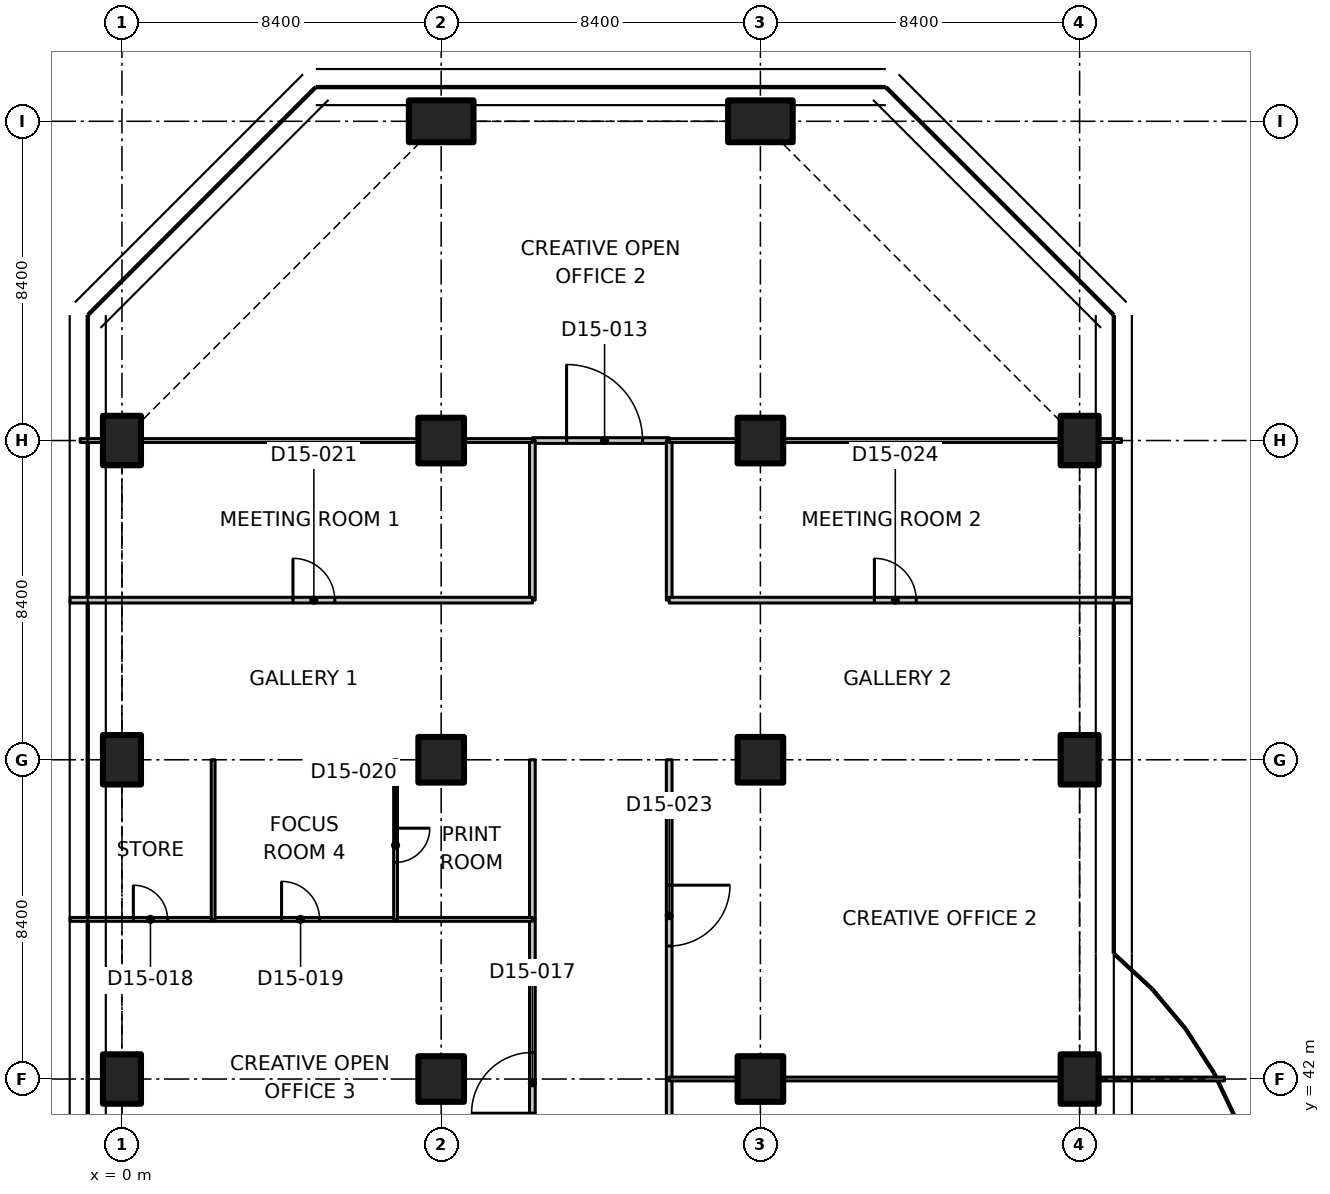
"""IFC4 building model, lengths in metres.
Left out: names, types, materials, properties, quantities, classifications, styles, units other than length and angle.
Written with IfcOpenShell. Run it as: python <this file> out.ifc"""

import sys

from ifc_helpers import new_model, si_unit, direction, frame, frame_2d, origin, origin_2d, place, context, subcontext, project, spatial, polyline, rectangle, outline, extrude, element, fill, save


model = new_model("IFC4")
c1 = context("Model", 3, precision=1e-05, world=origin(), true_north=direction((0.0, 1.0)))
c2 = subcontext(c1, "Body", "Model", "MODEL_VIEW")
j1 = project(units=[si_unit("LENGTHUNIT", "METRE"), si_unit("PLANEANGLEUNIT", "RADIAN")], contexts=[c1])
p1 = place(None, origin())
s1 = spatial("IfcSite", under=j1, at=p1, CompositionType="ELEMENT")
p2 = place(p1, origin())
s2 = spatial("IfcBuilding", under=s1, at=p2, CompositionType="ELEMENT")
p3 = place(p2, frame((0.0, 0.0, 120.5)))
s3 = spatial("IfcBuildingStorey", under=s2, at=p3, CompositionType="ELEMENT", Elevation=120.5)
for number, where, z_axis, x_axis in (
    (1, (0.0, 42.0, 0.0), (0.0, 0.0, 1.0), (1.0, 0.0, 0.0)),
    (2, (0.0, 50.4, 0.0), (0.0, 0.0, 1.0), (1.0, 0.0, 0.0)),
    (3, (0.0, 58.8, 0.0), (0.0, 0.0, 1.0), (1.0, 0.0, 0.0)),
):
    element("IfcColumn", number, at=place(p3, frame(where, z_axis=z_axis, x_axis=x_axis)), inside=s3, PredefinedType="COLUMN", context=c2, shape_type="SweptSolid", body=[
        extrude(rectangle(XDim=1.0, YDim=1.3, at=origin_2d()), origin(), (0.0, 0.0, 1.0), 3.35),
    ])
for number, where, z_axis, x_axis in (
    (4, (8.4, 42.0, 0.0), (0.0, 0.0, 1.0), (1.0, 0.0, 0.0)),
    (5, (8.4, 50.4, 0.0), (0.0, 0.0, 1.0), (1.0, 0.0, 0.0)),
    (6, (8.4, 58.8, 0.0), (0.0, 0.0, 1.0), (1.0, 0.0, 0.0)),
):
    element("IfcColumn", number, at=place(p3, frame(where, z_axis=z_axis, x_axis=x_axis)), inside=s3, PredefinedType="COLUMN", context=c2, shape_type="SweptSolid", body=[
        extrude(rectangle(XDim=1.2, YDim=1.2, at=origin_2d()), origin(), (0.0, 0.0, 1.0), 3.35),
    ])
p4 = place(p3, frame((8.4, 67.2, 0.0), z_axis=(0.0, 0.0, 1.0), x_axis=(0.0, 1.0, 0.0)))
e7 = element("IfcColumn", 7, at=p4, inside=s3, PredefinedType="COLUMN", context=c2, shape_type="SweptSolid", body=[
    extrude(rectangle(XDim=1.1, YDim=1.7, at=origin_2d()), origin(), (0.0, 0.0, 1.0), 3.35),
])
for number, where, z_axis, x_axis in (
    (8, (16.8, 42.0, 0.0), (0.0, 0.0, 1.0), (1.0, 0.0, 0.0)),
    (9, (16.8, 50.4, 0.0), (0.0, 0.0, 1.0), (1.0, 0.0, 0.0)),
    (10, (16.8, 58.8, 0.0), (0.0, 0.0, 1.0), (1.0, 0.0, 0.0)),
):
    element("IfcColumn", number, at=place(p3, frame(where, z_axis=z_axis, x_axis=x_axis)), inside=s3, PredefinedType="COLUMN", context=c2, shape_type="SweptSolid", body=[
        extrude(rectangle(XDim=1.2, YDim=1.2, at=origin_2d()), origin(), (0.0, 0.0, 1.0), 3.35),
    ])
p5 = place(p3, frame((16.8, 67.2, 0.0), z_axis=(0.0, 0.0, 1.0), x_axis=(0.0, 1.0, 0.0)))
e11 = element("IfcColumn", 11, at=p5, inside=s3, PredefinedType="COLUMN", context=c2, shape_type="SweptSolid", body=[
    extrude(rectangle(XDim=1.1, YDim=1.7, at=origin_2d()), origin(), (0.0, 0.0, 1.0), 3.35),
])
for number, where, z_axis, x_axis in (
    (12, (25.2, 42.0, 0.0), (0.0, 0.0, 1.0), (1.0, 0.0, 0.0)),
    (13, (25.2, 50.4, 0.0), (0.0, 0.0, 1.0), (1.0, 0.0, 0.0)),
    (14, (25.2, 58.8, 0.0), (0.0, 0.0, 1.0), (1.0, 0.0, 0.0)),
):
    element("IfcColumn", number, at=place(p3, frame(where, z_axis=z_axis, x_axis=x_axis)), inside=s3, PredefinedType="COLUMN", context=c2, shape_type="SweptSolid", body=[
        extrude(rectangle(XDim=1.0, YDim=1.3, at=origin_2d()), origin(), (0.0, 0.0, 1.0), 3.35),
    ])
p6 = place(p3, frame((10.8, 58.8, 0.0), z_axis=(0.0, 0.0, 1.0), x_axis=(1.0, 0.0, 0.0)))
e15 = element("IfcWall", 15, at=p6, inside=s3, PredefinedType="PARTITIONING", context=c2, shape_type="SweptSolid", body=[
    extrude(rectangle(XDim=3.6, YDim=0.15, at=frame_2d((1.8, 0.0))), origin(), (0.0, 0.0, 1.0), 3.33),
])
p7 = place(p6, frame((0.9, 0.0, 0.0)))
e16 = element("IfcOpeningElement", 16, at=p7, cuts=e15, PredefinedType="OPENING", context=c2, shape_type="SweptSolid", body=[
    extrude(rectangle(XDim=2.0, YDim=2.4, at=frame_2d((1.0, 1.2))), frame((0.0, 0.085, 0.0), z_axis=(0.0, -1.0, 0.0), x_axis=(1.0, 0.0, 0.0)), (0.0, 0.0, 1.0), 0.17),
])
p8 = place(p3, frame((10.8, 37.8, 0.0), z_axis=(0.0, 0.0, 1.0), x_axis=(0.0, 1.0, 0.0)))
e17 = element("IfcWall", 17, at=p8, inside=s3, PredefinedType="PARTITIONING", context=c2, shape_type="SweptSolid", body=[
    extrude(rectangle(XDim=8.4, YDim=0.15, at=frame_2d((4.2, 0.0))), origin(), (0.0, 0.0, 1.0), 3.33),
])
p9 = place(p8, frame((3.3, 0.0, 0.0)))
e18 = element("IfcOpeningElement", 18, at=p9, cuts=e17, PredefinedType="OPENING", context=c2, shape_type="SweptSolid", body=[
    extrude(rectangle(XDim=1.6, YDim=2.1, at=frame_2d((0.8, 1.05))), frame((0.0, 0.085, 0.0), z_axis=(0.0, -1.0, 0.0), x_axis=(1.0, 0.0, 0.0)), (0.0, 0.0, 1.0), 0.17),
])
for number, where, z_axis, x_axis in (
    (19, (10.8, 46.2, 0.0), (0.0, 0.0, 1.0), (0.0, 1.0, 0.0)),
    (20, (10.8, 54.6, 0.0), (0.0, 0.0, 1.0), (0.0, 1.0, 0.0)),
):
    element("IfcWall", number, at=place(p3, frame(where, z_axis=z_axis, x_axis=x_axis)), inside=s3, PredefinedType="PARTITIONING", context=c2, shape_type="SweptSolid", body=[
        extrude(rectangle(XDim=4.2, YDim=0.15, at=frame_2d((2.1, 0.0))), origin(), (0.0, 0.0, 1.0), 3.33),
    ])
p10 = place(p3, frame((14.4, 42.0, 0.0), z_axis=(0.0, 0.0, 1.0), x_axis=(0.0, -1.0, 0.0)))
e21 = element("IfcWall", 21, at=p10, inside=s3, PredefinedType="PARTITIONING", context=c2, shape_type="SweptSolid", body=[
    extrude(rectangle(XDim=8.4, YDim=0.15, at=frame_2d((4.2, 0.0))), origin(), (0.0, 0.0, 1.0), 3.33),
])
p11 = place(p3, frame((14.4, 50.4, 0.0), z_axis=(0.0, 0.0, 1.0), x_axis=(0.0, -1.0, 0.0)))
e22 = element("IfcWall", 22, at=p11, inside=s3, PredefinedType="PARTITIONING", context=c2, shape_type="SweptSolid", body=[
    extrude(rectangle(XDim=8.4, YDim=0.15, at=frame_2d((4.2, 0.0))), origin(), (0.0, 0.0, 1.0), 3.33),
])
p12 = place(p11, frame((3.3, 0.0, 0.0)))
e23 = element("IfcOpeningElement", 23, at=p12, cuts=e22, PredefinedType="OPENING", context=c2, shape_type="SweptSolid", body=[
    extrude(rectangle(XDim=1.6, YDim=2.1, at=frame_2d((0.8, 1.05))), frame((0.0, 0.085, 0.0), z_axis=(0.0, -1.0, 0.0), x_axis=(1.0, 0.0, 0.0)), (0.0, 0.0, 1.0), 0.17),
])
p13 = place(p3, frame((14.4, 58.8, 0.0), z_axis=(0.0, 0.0, 1.0), x_axis=(0.0, -1.0, 0.0)))
e24 = element("IfcWall", 24, at=p13, inside=s3, PredefinedType="PARTITIONING", context=c2, shape_type="SweptSolid", body=[
    extrude(rectangle(XDim=4.2, YDim=0.15, at=frame_2d((2.1, 0.0))), origin(), (0.0, 0.0, 1.0), 3.33),
])
p14 = place(p3, frame((10.8, 58.8, 0.0), z_axis=(0.0, 0.0, 1.0), x_axis=(-1.0, 0.0, 0.0)))
e25 = element("IfcWall", 25, at=p14, inside=s3, PredefinedType="PARTITIONING", context=c2, shape_type="SweptSolid", body=[
    extrude(rectangle(XDim=1.78, YDim=0.1, at=frame_2d((0.89, 0.0))), origin(), (0.0, 0.0, 1.0), 3.33),
])
p15 = place(p3, frame((7.78, 58.8, 0.0), z_axis=(0.0, 0.0, 1.0), x_axis=(-1.0, 0.0, 0.0)))
e26 = element("IfcWall", 26, at=p15, inside=s3, PredefinedType="PARTITIONING", context=c2, shape_type="SweptSolid", body=[
    extrude(outline(polyline([(0.0, 0.0), (7.26, 0.0), (7.26, 2.98), (7.116, 2.98), (7.114, 3.33), (0.0, 3.33), (0.0, 0.0)])), frame((0.0, 0.05, 0.0), z_axis=(0.0, -1.0, 0.0), x_axis=(1.0, 0.0, 0.0)), (0.0, 0.0, 1.0), 0.1),
])
for number, where, z_axis, x_axis in (
    (27, (-0.52, 58.8, 0.0), (0.0, 0.0, 1.0), (-1.0, 0.0, 0.0)),
    (28, (26.3, 58.8, 0.0), (0.0, 0.0, 1.0), (-1.0, 0.0, 0.0)),
):
    element("IfcWall", number, at=place(p3, frame(where, z_axis=z_axis, x_axis=x_axis)), inside=s3, PredefinedType="PARTITIONING", context=c2, shape_type="SweptSolid", body=[
        extrude(rectangle(XDim=0.58, YDim=0.1, at=frame_2d((0.29, 0.0))), origin(), (0.0, 0.0, 1.0), 3.33),
    ])
p16 = place(p3, frame((24.68, 58.8, 0.0), z_axis=(0.0, 0.0, 1.0), x_axis=(-1.0, 0.0, 0.0)))
e29 = element("IfcWall", 29, at=p16, inside=s3, PredefinedType="PARTITIONING", context=c2, shape_type="SweptSolid", body=[
    extrude(outline(polyline([(0.0, 0.0), (7.26, 0.0), (7.26, 3.33), (0.146, 3.33), (0.144, 2.98), (0.0, 2.98), (0.0, 0.0)])), frame((0.0, 0.05, 0.0), z_axis=(0.0, -1.0, 0.0), x_axis=(1.0, 0.0, 0.0)), (0.0, 0.0, 1.0), 0.1),
])
p17 = place(p3, frame((16.18, 58.8, 0.0), z_axis=(0.0, 0.0, 1.0), x_axis=(-1.0, 0.0, 0.0)))
e30 = element("IfcWall", 30, at=p17, inside=s3, PredefinedType="PARTITIONING", context=c2, shape_type="SweptSolid", body=[
    extrude(rectangle(XDim=1.78, YDim=0.1, at=frame_2d((0.89, 0.0))), origin(), (0.0, 0.0, 1.0), 3.33),
])
p18 = place(p3, frame((-1.365, 54.6, 0.0), z_axis=(0.0, 0.0, 1.0), x_axis=(1.0, 0.0, 0.0)))
e31 = element("IfcWall", 31, at=p18, inside=s3, PredefinedType="PARTITIONING", context=c2, shape_type="SweptSolid", body=[
    extrude(outline(polyline([(0.0, 0.0), (12.165, 0.0), (12.165, 3.33), (1.815, 3.33), (1.813, 2.98), (0.917, 2.98), (0.915, 3.33), (0.265, 3.33), (0.0, 3.33), (0.0, 0.0)])), frame((0.0, 0.075, 0.0), z_axis=(0.0, -1.0, 0.0), x_axis=(1.0, 0.0, 0.0)), (0.0, 0.0, 1.0), 0.15),
])
p19 = place(p18, frame((5.865, 0.0, 0.0)))
e32 = element("IfcOpeningElement", 32, at=p19, cuts=e31, PredefinedType="OPENING", context=c2, shape_type="SweptSolid", body=[
    extrude(rectangle(XDim=1.1, YDim=2.1, at=frame_2d((0.55, 1.05))), frame((0.0, 0.085, 0.0), z_axis=(0.0, -1.0, 0.0), x_axis=(1.0, 0.0, 0.0)), (0.0, 0.0, 1.0), 0.17),
])
p20 = place(p3, frame((-1.365, 46.2, 0.0), z_axis=(0.0, 0.0, 1.0), x_axis=(1.0, 0.0, 0.0)))
e33 = element("IfcWall", 33, at=p20, inside=s3, PredefinedType="PARTITIONING", context=c2, shape_type="SweptSolid", body=[
    extrude(rectangle(XDim=3.765, YDim=0.1, at=frame_2d((1.882, 0.0))), origin(), (0.0, 0.0, 1.0), 2.98),
])
p21 = place(p20, frame((1.665, 0.0, 0.0)))
e34 = element("IfcOpeningElement", 34, at=p21, cuts=e33, PredefinedType="OPENING", context=c2, shape_type="SweptSolid", body=[
    extrude(rectangle(XDim=0.9, YDim=2.1, at=frame_2d((0.45, 1.05))), frame((0.0, 0.06, 0.0), z_axis=(0.0, -1.0, 0.0), x_axis=(1.0, 0.0, 0.0)), (0.0, 0.0, 1.0), 0.12),
])
p22 = place(p3, frame((2.4, 46.2, 0.0), z_axis=(0.0, 0.0, 1.0), x_axis=(1.0, 0.0, 0.0)))
e35 = element("IfcWall", 35, at=p22, inside=s3, PredefinedType="PARTITIONING", context=c2, shape_type="SweptSolid", body=[
    extrude(rectangle(XDim=4.8, YDim=0.1, at=frame_2d((2.4, 0.0))), origin(), (0.0, 0.0, 1.0), 3.33),
])
p23 = place(p22, frame((1.8, 0.0, 0.0)))
e36 = element("IfcOpeningElement", 36, at=p23, cuts=e35, PredefinedType="OPENING", context=c2, shape_type="SweptSolid", body=[
    extrude(rectangle(XDim=1.0, YDim=2.1, at=frame_2d((0.5, 1.05))), frame((0.0, 0.06, 0.0), z_axis=(0.0, -1.0, 0.0), x_axis=(1.0, 0.0, 0.0)), (0.0, 0.0, 1.0), 0.12),
])
p24 = place(p3, frame((7.2, 46.2, 0.0), z_axis=(0.0, 0.0, 1.0), x_axis=(1.0, 0.0, 0.0)))
e37 = element("IfcWall", 37, at=p24, inside=s3, PredefinedType="PARTITIONING", context=c2, shape_type="SweptSolid", body=[
    extrude(rectangle(XDim=3.6, YDim=0.1, at=frame_2d((1.8, 0.0))), origin(), (0.0, 0.0, 1.0), 3.33),
])
p25 = place(p3, frame((2.4, 50.4, 0.0), z_axis=(0.0, 0.0, 1.0), x_axis=(0.0, -1.0, 0.0)))
e38 = element("IfcWall", 38, at=p25, inside=s3, PredefinedType="PARTITIONING", context=c2, shape_type="SweptSolid", body=[
    extrude(rectangle(XDim=4.2, YDim=0.1, at=frame_2d((2.1, 0.0))), origin(), (0.0, 0.0, 1.0), 3.33),
])
p26 = place(p3, frame((7.2, 50.4, 0.0), z_axis=(0.0, 0.0, 1.0), x_axis=(0.0, -1.0, 0.0)))
e39 = element("IfcWall", 39, at=p26, inside=s3, PredefinedType="PARTITIONING", context=c2, shape_type="SweptSolid", body=[
    extrude(rectangle(XDim=4.2, YDim=0.1, at=frame_2d((2.1, 0.0))), origin(), (0.0, 0.0, 1.0), 3.33),
])
p27 = place(p26, frame((1.8, 0.0, 0.0)))
e40 = element("IfcOpeningElement", 40, at=p27, cuts=e39, PredefinedType="OPENING", context=c2, shape_type="SweptSolid", body=[
    extrude(rectangle(XDim=0.9, YDim=2.1, at=frame_2d((0.45, 1.05))), frame((0.0, 0.06, 0.0), z_axis=(0.0, -1.0, 0.0), x_axis=(1.0, 0.0, 0.0)), (0.0, 0.0, 1.0), 0.12),
])
p28 = place(p3, frame((14.4, 54.6, 0.0), z_axis=(0.0, 0.0, 1.0), x_axis=(1.0, 0.0, 0.0)))
e41 = element("IfcWall", 41, at=p28, inside=s3, PredefinedType="PARTITIONING", context=c2, shape_type="SweptSolid", body=[
    extrude(outline(polyline([(0.0, 0.0), (12.165, 0.0), (12.165, 3.33), (11.9, 3.33), (11.25, 3.33), (11.248, 2.98), (10.352, 2.98), (10.35, 3.33), (0.0, 3.33), (0.0, 0.0)])), frame((0.0, 0.075, 0.0), z_axis=(0.0, -1.0, 0.0), x_axis=(1.0, 0.0, 0.0)), (0.0, 0.0, 1.0), 0.15),
])
p29 = place(p28, frame((5.4, 0.0, 0.0)))
e42 = element("IfcOpeningElement", 42, at=p29, cuts=e41, PredefinedType="OPENING", context=c2, shape_type="SweptSolid", body=[
    extrude(rectangle(XDim=1.1, YDim=2.1, at=frame_2d((0.55, 1.05))), frame((0.0, 0.085, 0.0), z_axis=(0.0, -1.0, 0.0), x_axis=(1.0, 0.0, 0.0)), (0.0, 0.0, 1.0), 0.17),
])
p30 = place(p3, frame((14.4, 42.0, 0.0), z_axis=(0.0, 0.0, 1.0), x_axis=(1.0, 0.0, 0.0)))
e43 = element("IfcWall", 43, at=p30, inside=s3, PredefinedType="PARTITIONING", context=c2, shape_type="SweptSolid", body=[
    extrude(rectangle(XDim=1.78, YDim=0.1, at=frame_2d((0.89, 0.0))), origin(), (0.0, 0.0, 1.0), 3.33),
])
p31 = place(p3, frame((17.42, 42.0, 0.0), z_axis=(0.0, 0.0, 1.0), x_axis=(1.0, 0.0, 0.0)))
e44 = element("IfcWall", 44, at=p31, inside=s3, PredefinedType="PARTITIONING", context=c2, shape_type="SweptSolid", body=[
    extrude(rectangle(XDim=7.26, YDim=0.1, at=frame_2d((3.63, 0.0))), origin(), (0.0, 0.0, 1.0), 3.33),
])
p32 = place(p3, frame((25.72, 42.0, 0.0), z_axis=(0.0, 0.0, 1.0), x_axis=(1.0, 0.0, 0.0)))
e45 = element("IfcWall", 45, at=p32, inside=s3, PredefinedType="PARTITIONING", context=c2, shape_type="SweptSolid", body=[
    extrude(rectangle(XDim=3.292, YDim=0.1, at=frame_2d((1.646, 0.0))), origin(), (0.0, 0.0, 1.0), 2.98),
])
p33 = place(p7, origin())
e46 = element("IfcDoor", 46, at=p33, inside=s3, OperationType="DOUBLE_DOOR_SINGLE_SWING", PredefinedType="DOOR", context=c2, shape_type="SweptSolid", body=[
    extrude(rectangle(XDim=2.0, YDim=2.4, at=frame_2d((1.0, 1.2))), frame((0.0, 0.025, 0.0), z_axis=(0.0, -1.0, 0.0), x_axis=(1.0, 0.0, 0.0)), (0.0, 0.0, 1.0), 0.05),
])
fill(e16, e46)
p34 = place(p9, origin())
e47 = element("IfcDoor", 47, at=p34, inside=s3, OperationType="DOUBLE_DOOR_SINGLE_SWING", PredefinedType="DOOR", context=c2, shape_type="SweptSolid", body=[
    extrude(rectangle(XDim=1.6, YDim=2.1, at=frame_2d((0.8, 1.05))), frame((0.0, 0.025, 0.0), z_axis=(0.0, -1.0, 0.0), x_axis=(1.0, 0.0, 0.0)), (0.0, 0.0, 1.0), 0.05),
])
fill(e18, e47)
p35 = place(p21, origin())
e48 = element("IfcDoor", 48, at=p35, inside=s3, OperationType="SINGLE_SWING_LEFT", PredefinedType="DOOR", context=c2, shape_type="SweptSolid", body=[
    extrude(rectangle(XDim=0.9, YDim=2.1, at=frame_2d((0.45, 1.05))), frame((0.0, 0.025, 0.0), z_axis=(0.0, -1.0, 0.0), x_axis=(1.0, 0.0, 0.0)), (0.0, 0.0, 1.0), 0.05),
])
fill(e34, e48)
p36 = place(p23, origin())
e49 = element("IfcDoor", 49, at=p36, inside=s3, OperationType="SINGLE_SWING_LEFT", PredefinedType="DOOR", context=c2, shape_type="SweptSolid", body=[
    extrude(rectangle(XDim=1.0, YDim=2.1, at=frame_2d((0.5, 1.05))), frame((0.0, 0.025, 0.0), z_axis=(0.0, -1.0, 0.0), x_axis=(1.0, 0.0, 0.0)), (0.0, 0.0, 1.0), 0.05),
])
fill(e36, e49)
p37 = place(p27, origin())
e50 = element("IfcDoor", 50, at=p37, inside=s3, OperationType="SINGLE_SWING_LEFT", PredefinedType="DOOR", context=c2, shape_type="SweptSolid", body=[
    extrude(rectangle(XDim=0.9, YDim=2.1, at=frame_2d((0.45, 1.05))), frame((0.0, 0.025, 0.0), z_axis=(0.0, -1.0, 0.0), x_axis=(1.0, 0.0, 0.0)), (0.0, 0.0, 1.0), 0.05),
])
fill(e40, e50)
p38 = place(p19, origin())
e51 = element("IfcDoor", 51, at=p38, inside=s3, OperationType="SINGLE_SWING_LEFT", PredefinedType="DOOR", context=c2, shape_type="SweptSolid", body=[
    extrude(rectangle(XDim=1.1, YDim=2.1, at=frame_2d((0.55, 1.05))), frame((0.0, 0.025, 0.0), z_axis=(0.0, -1.0, 0.0), x_axis=(1.0, 0.0, 0.0)), (0.0, 0.0, 1.0), 0.05),
])
fill(e32, e51)
p39 = place(p12, origin())
e52 = element("IfcDoor", 52, at=p39, inside=s3, OperationType="DOUBLE_DOOR_SINGLE_SWING", PredefinedType="DOOR", context=c2, shape_type="SweptSolid", body=[
    extrude(rectangle(XDim=1.6, YDim=2.1, at=frame_2d((0.8, 1.05))), frame((0.0, 0.025, 0.0), z_axis=(0.0, -1.0, 0.0), x_axis=(1.0, 0.0, 0.0)), (0.0, 0.0, 1.0), 0.05),
])
fill(e23, e52)
p40 = place(p29, origin())
e53 = element("IfcDoor", 53, at=p40, inside=s3, OperationType="SINGLE_SWING_LEFT", PredefinedType="DOOR", context=c2, shape_type="SweptSolid", body=[
    extrude(rectangle(XDim=1.1, YDim=2.1, at=frame_2d((0.55, 1.05))), frame((0.0, 0.025, 0.0), z_axis=(0.0, -1.0, 0.0), x_axis=(1.0, 0.0, 0.0)), (0.0, 0.0, 1.0), 0.05),
])
fill(e42, e53)
save(model, sys.argv[1])
